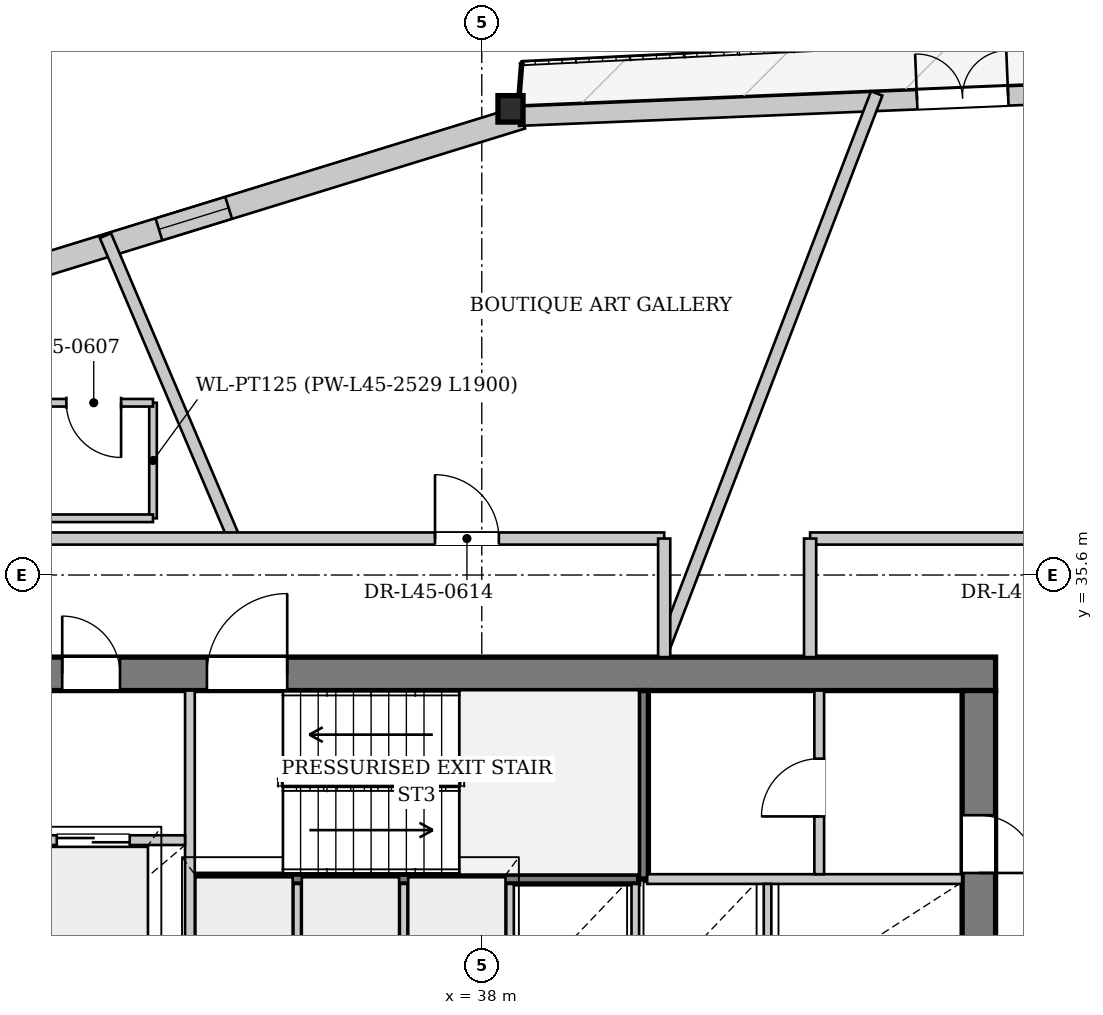
"""IFC4 building model, lengths in metres.
Left out: names, types, materials, properties, quantities, classifications, styles, units other than length and angle.
Written with IfcOpenShell. Run it as: python <this file> out.ifc"""

import sys

from ifc_helpers import new_model, si_unit, direction, frame, frame_2d, origin, origin_2d, place, context, subcontext, project, spatial, rectangle, i_section, extrude, source, transform, mapped, element, fill, save


model = new_model("IFC4")
c1 = context("Model", 3, precision=1e-05, world=origin(), true_north=direction((0.0, 1.0)))
c2 = subcontext(c1, "Body", "Model", "MODEL_VIEW")
j1 = project(units=[si_unit("LENGTHUNIT", "METRE"), si_unit("PLANEANGLEUNIT", "RADIAN")], contexts=[c1])
p1 = place(None, origin())
s1 = spatial("IfcSite", under=j1, at=p1, CompositionType="ELEMENT")
p2 = place(p1, origin())
s2 = spatial("IfcBuilding", under=s1, at=p2, CompositionType="ELEMENT")
p3 = place(p2, frame((0.0, 0.0, 171.45)))
s3 = spatial("IfcBuildingStorey", under=s2, at=p3, CompositionType="ELEMENT", Elevation=171.45)
m1 = source(origin(), c2, "Body", "SweptSolid", [
    extrude(i_section(OverallWidth=0.412, OverallDepth=0.435, WebThickness=0.031, FlangeThickness=0.05, at=origin_2d()), origin(), (0.0, 0.0, 1.0), 3.396),
])
p4 = place(p3, frame((38.6, 43.306, 0.0), z_axis=(-0.075279188452, -0.023223665587, 0.99689202281), x_axis=(0.29479123516, -0.955561681773, 0.0)))
e1 = element("IfcColumn", 1, at=p4, inside=s3, PredefinedType="COLUMN", context=c2, shape_type="MappedRepresentation", body=[
    mapped(m1, transform((0.0, 0.0, 0.0), x_axis=(1.0, 0.0, 0.0), y_axis=(0.0, 1.0, 0.0), z_axis=(0.0, 0.0, 1.0), scale=1.0)),
])
p5 = place(p3, frame((16.837, 36.396, 0.0), z_axis=(0.0, 0.0, 1.0), x_axis=(0.955604756782, 0.294651571887, 0.0)))
e2 = element("IfcWall", 2, at=p5, inside=s3, PredefinedType="SOLIDWALL", context=c2, shape_type="SweptSolid", body=[
    extrude(rectangle(XDim=22.833, YDim=0.38, at=frame_2d((11.417, 0.0))), origin(), (0.0, 0.0, 1.0), 2.722),
])
p6 = place(p5, frame((5.793, 0.0, 0.65)))
e3 = element("IfcOpeningElement", 3, at=p6, cuts=e2, PredefinedType="OPENING", context=c2, shape_type="SweptSolid", body=[
    extrude(rectangle(XDim=1.2, YDim=1.5, at=frame_2d((0.6, 0.75))), frame((0.0, 0.2, 0.0), z_axis=(0.0, -1.0, 0.0), x_axis=(1.0, 0.0, 0.0)), (0.0, 0.0, 1.0), 0.4),
])
p7 = place(p5, frame((16.59, 0.0, 0.65)))
e4 = element("IfcOpeningElement", 4, at=p7, cuts=e2, PredefinedType="OPENING", context=c2, shape_type="SweptSolid", body=[
    extrude(rectangle(XDim=1.2, YDim=1.5, at=frame_2d((0.6, 0.75))), frame((0.0, 0.2, 0.0), z_axis=(0.0, -1.0, 0.0), x_axis=(1.0, 0.0, 0.0)), (0.0, 0.0, 1.0), 0.4),
])
p8 = place(p3, frame((38.607, 43.146, 0.0), z_axis=(0.0, 0.0, 1.0), x_axis=(0.999144377046, 0.041358358487, 0.0)))
e5 = element("IfcWall", 5, at=p8, inside=s3, PredefinedType="SOLIDWALL", context=c2, shape_type="SweptSolid", body=[
    extrude(rectangle(XDim=22.833, YDim=0.32, at=frame_2d((11.417, 0.0))), origin(), (0.0, 0.0, 1.0), 2.722),
])
p9 = place(p8, frame((6.557, 0.0, 0.0)))
e6 = element("IfcOpeningElement", 6, at=p9, cuts=e5, PredefinedType="OPENING", context=c2, shape_type="SweptSolid", body=[
    extrude(rectangle(XDim=1.5, YDim=2.3, at=frame_2d((0.75, 1.15))), frame((0.0, 0.17, 0.0), z_axis=(0.0, -1.0, 0.0), x_axis=(1.0, 0.0, 0.0)), (0.0, 0.0, 1.0), 0.34),
])
p10 = place(p8, frame((15.596, 0.0, 0.252)))
e7 = element("IfcOpeningElement", 7, at=p10, cuts=e5, PredefinedType="OPENING", context=c2, shape_type="SweptSolid", body=[
    extrude(rectangle(XDim=2.6, YDim=2.35, at=frame_2d((1.3, 1.175))), frame((0.0, 0.17, 0.0), z_axis=(0.0, -1.0, 0.0), x_axis=(1.0, 0.0, 0.0)), (0.0, 0.0, 1.0), 0.34),
])
p11 = place(p3, frame((29.55, 33.975, 0.0), z_axis=(0.0, 0.0, 1.0), x_axis=(1.0, 0.0, 0.0)))
e8 = element("IfcWall", 8, at=p11, inside=s3, PredefinedType="SHEAR", context=c2, shape_type="SweptSolid", body=[
    extrude(rectangle(XDim=16.9, YDim=0.55, at=frame_2d((8.45, 0.0))), origin(), (0.0, 0.0, 1.0), 3.33),
])
p12 = place(p11, frame((1.55, 0.0, 0.0)))
e9 = element("IfcOpeningElement", 9, at=p12, cuts=e8, PredefinedType="OPENING", context=c2, shape_type="SweptSolid", body=[
    extrude(rectangle(XDim=0.95, YDim=2.1, at=frame_2d((0.475, 1.05))), frame((0.0, 0.285, 0.0), z_axis=(0.0, -1.0, 0.0), x_axis=(1.0, 0.0, 0.0)), (0.0, 0.0, 1.0), 0.57),
])
p13 = place(p11, frame((3.93, 0.0, 0.0)))
e10 = element("IfcOpeningElement", 10, at=p13, cuts=e8, PredefinedType="OPENING", context=c2, shape_type="SweptSolid", body=[
    extrude(rectangle(XDim=1.32, YDim=2.2, at=frame_2d((0.66, 1.1))), frame((0.0, 0.285, 0.0), z_axis=(0.0, -1.0, 0.0), x_axis=(1.0, 0.0, 0.0)), (0.0, 0.0, 1.0), 0.57),
])
p14 = place(p3, frame((46.175, 33.7, 0.0), z_axis=(0.0, 0.0, 1.0), x_axis=(0.0, -1.0, 0.0)))
e11 = element("IfcWall", 11, at=p14, inside=s3, PredefinedType="SHEAR", context=c2, shape_type="SweptSolid", body=[
    extrude(rectangle(XDim=14.2, YDim=0.55, at=frame_2d((7.1, 0.0))), origin(), (0.0, 0.0, 1.0), 3.33),
])
p15 = place(p14, frame((5.18, 0.0, 0.0)))
e12 = element("IfcOpeningElement", 12, at=p15, cuts=e11, PredefinedType="OPENING", context=c2, shape_type="SweptSolid", body=[
    extrude(rectangle(XDim=1.6, YDim=2.2, at=frame_2d((0.8, 1.1))), frame((0.0, 0.285, 0.0), z_axis=(0.0, -1.0, 0.0), x_axis=(1.0, 0.0, 0.0)), (0.0, 0.0, 1.0), 0.57),
])
p16 = place(p14, frame((2.05, 0.0, 0.0)))
e13 = element("IfcOpeningElement", 13, at=p16, cuts=e11, PredefinedType="OPENING", context=c2, shape_type="SweptSolid", body=[
    extrude(rectangle(XDim=0.95, YDim=2.1, at=frame_2d((0.475, 1.05))), frame((0.0, 0.285, 0.0), z_axis=(0.0, -1.0, 0.0), x_axis=(1.0, 0.0, 0.0)), (0.0, 0.0, 1.0), 0.57),
])
p17 = place(p3, frame((33.28, 30.6, 0.0), z_axis=(0.0, 0.0, 1.0), x_axis=(1.0, 0.0, 0.0)))
e14 = element("IfcWall", 14, at=p17, inside=s3, PredefinedType="PARTITIONING", context=c2, shape_type="SweptSolid", body=[
    extrude(rectangle(XDim=7.3, YDim=0.16, at=frame_2d((3.65, 0.0))), origin(), (0.0, 0.0, 1.0), 3.33),
])
p18 = place(p3, frame((40.66, 30.6, 0.0), z_axis=(0.0, 0.0, 1.0), x_axis=(0.0, 1.0, 0.0)))
e15 = element("IfcWall", 15, at=p18, inside=s3, PredefinedType="PARTITIONING", context=c2, shape_type="SweptSolid", body=[
    extrude(rectangle(XDim=3.1, YDim=0.16, at=frame_2d((1.55, 0.0))), origin(), (0.0, 0.0, 1.0), 3.33),
])
p19 = place(p3, frame((33.2, 28.44, 0.0), z_axis=(0.0, 0.0, 1.0), x_axis=(0.0, 1.0, 0.0)))
e16 = element("IfcWall", 16, at=p19, inside=s3, PredefinedType="PARTITIONING", context=c2, shape_type="SweptSolid", body=[
    extrude(rectangle(XDim=5.26, YDim=0.16, at=frame_2d((2.63, 0.0))), origin(), (0.0, 0.0, 1.0), 3.33),
])
p20 = place(p3, frame((30.1, 31.24, 0.0), z_axis=(0.0, 0.0, 1.0), x_axis=(1.0, 0.0, 0.0)))
e17 = element("IfcWall", 17, at=p20, inside=s3, PredefinedType="PARTITIONING", context=c2, shape_type="SweptSolid", body=[
    extrude(rectangle(XDim=3.02, YDim=0.16, at=frame_2d((1.51, 0.0))), origin(), (0.0, 0.0, 1.0), 3.33),
])
p21 = place(p20, frame((0.91, 0.0, 0.0)))
e18 = element("IfcOpeningElement", 18, at=p21, cuts=e17, PredefinedType="OPENING", context=c2, shape_type="SweptSolid", body=[
    extrude(rectangle(XDim=1.2, YDim=2.2, at=frame_2d((0.6, 1.1))), frame((0.0, 0.09, 0.0), z_axis=(0.0, -1.0, 0.0), x_axis=(1.0, 0.0, 0.0)), (0.0, 0.0, 1.0), 0.18),
])
p22 = place(p3, frame((40.72, 30.6, 0.0), z_axis=(0.0, 0.0, 1.0), x_axis=(1.0, 0.0, 0.0)))
e19 = element("IfcWall", 19, at=p22, inside=s3, PredefinedType="PARTITIONING", context=c2, shape_type="SweptSolid", body=[
    extrude(rectangle(XDim=5.18, YDim=0.16, at=frame_2d((2.59, 0.0))), origin(), (0.0, 0.0, 1.0), 3.33),
])
for number, where, z_axis, x_axis in (
    (20, (34.965, 28.6, 0.0), (0.0, 0.0, 1.0), (0.0, 1.0, 0.0)),
    (21, (36.715, 28.6, 0.0), (0.0, 0.0, 1.0), (0.0, 1.0, 0.0)),
    (22, (38.465, 28.6, 0.0), (0.0, 0.0, 1.0), (0.0, 1.0, 0.0)),
    (23, (40.525, 28.6, 0.0), (0.0, 0.0, 1.0), (0.0, 1.0, 0.0)),
    (24, (42.7, 28.6, 0.0), (0.0, 0.0, 1.0), (0.0, 1.0, 0.0)),
):
    element("IfcWall", number, at=place(p3, frame(where, z_axis=z_axis, x_axis=x_axis)), inside=s3, PredefinedType="PARTITIONING", context=c2, shape_type="SweptSolid", body=[
        extrude(rectangle(XDim=1.92, YDim=0.125, at=frame_2d((0.96, 0.0))), origin(), (0.0, 0.0, 1.0), 3.33),
    ])
p23 = place(p3, frame((43.55, 30.68, 0.0), z_axis=(0.0, 0.0, 1.0), x_axis=(0.0, 1.0, 0.0)))
e25 = element("IfcWall", 25, at=p23, inside=s3, PredefinedType="PARTITIONING", context=c2, shape_type="SweptSolid", body=[
    extrude(rectangle(XDim=3.02, YDim=0.16, at=frame_2d((1.51, 0.0))), origin(), (0.0, 0.0, 1.0), 3.33),
])
p24 = place(p23, frame((0.95, 0.0, 0.0)))
e26 = element("IfcOpeningElement", 26, at=p24, cuts=e25, PredefinedType="OPENING", context=c2, shape_type="SweptSolid", body=[
    extrude(rectangle(XDim=0.95, YDim=2.1, at=frame_2d((0.475, 1.05))), frame((0.0, 0.09, 0.0), z_axis=(0.0, -1.0, 0.0), x_axis=(1.0, 0.0, 0.0)), (0.0, 0.0, 1.0), 0.18),
])
p25 = place(p3, frame((41.0, 34.415, 0.0), z_axis=(0.0, 0.0, 1.0), x_axis=(0.358366692875, 0.933580908887, 0.0)))
e27 = element("IfcWall", 27, at=p25, inside=s3, PredefinedType="PARTITIONING", context=c2, shape_type="SweptSolid", body=[
    extrude(rectangle(XDim=9.752, YDim=0.2, at=frame_2d((4.876, 0.0))), origin(), (0.0, 0.0, 1.0), 3.33),
])
p26 = place(p3, frame((33.925, 36.2, 0.0), z_axis=(0.0, 0.0, 1.0), x_axis=(-0.390725959749, 0.920507047436, 0.0)))
e28 = element("IfcWall", 28, at=p26, inside=s3, PredefinedType="PARTITIONING", context=c2, shape_type="SweptSolid", body=[
    extrude(rectangle(XDim=5.411, YDim=0.2, at=frame_2d((2.706, 0.0))), origin(), (0.0, 0.0, 1.0), 3.33),
])
p27 = place(p3, frame((32.593, 36.533, 0.0), z_axis=(0.0, 0.0, 1.0), x_axis=(0.0, 1.0, 0.0)))
e29 = element("IfcWall", 29, at=p27, inside=s3, PredefinedType="PARTITIONING", context=c2, shape_type="SweptSolid", body=[
    extrude(rectangle(XDim=1.9, YDim=0.125, at=frame_2d((0.95, 0.0))), origin(), (0.0, 0.0, 1.0), 3.33),
])
p28 = place(p3, frame((32.593, 38.433, 0.0), z_axis=(0.0, 0.0, 1.0), x_axis=(-1.0, 0.0, 0.0)))
e30 = element("IfcWall", 30, at=p28, inside=s3, PredefinedType="PARTITIONING", context=c2, shape_type="SweptSolid", body=[
    extrude(rectangle(XDim=1.95, YDim=0.125, at=frame_2d((0.975, 0.0))), origin(), (0.0, 0.0, 1.0), 3.33),
])
p29 = place(p28, frame((0.525, 0.0, 0.0)))
e31 = element("IfcOpeningElement", 31, at=p29, cuts=e30, PredefinedType="OPENING", context=c2, shape_type="SweptSolid", body=[
    extrude(rectangle(XDim=0.9, YDim=2.1, at=frame_2d((0.45, 1.05))), frame((0.0, 0.073, 0.0), z_axis=(0.0, -1.0, 0.0), x_axis=(1.0, 0.0, 0.0)), (0.0, 0.0, 1.0), 0.145),
])
p30 = place(p3, frame((30.643, 36.533, 0.0), z_axis=(0.0, 0.0, 1.0), x_axis=(1.0, 0.0, 0.0)))
e32 = element("IfcWall", 32, at=p30, inside=s3, PredefinedType="PARTITIONING", context=c2, shape_type="SweptSolid", body=[
    extrude(rectangle(XDim=1.95, YDim=0.125, at=frame_2d((0.975, 0.0))), origin(), (0.0, 0.0, 1.0), 3.33),
])
p31 = place(p3, frame((27.6, 36.2, 0.0), z_axis=(0.0, 0.0, 1.0), x_axis=(1.0, 0.0, 0.0)))
e33 = element("IfcWall", 33, at=p31, inside=s3, PredefinedType="PARTITIONING", context=c2, shape_type="SweptSolid", body=[
    extrude(rectangle(XDim=13.4, YDim=0.2, at=frame_2d((6.7, 0.0))), origin(), (0.0, 0.0, 1.0), 3.33),
])
p32 = place(p31, frame((9.631, 0.0, 0.0)))
e34 = element("IfcOpeningElement", 34, at=p32, cuts=e33, PredefinedType="OPENING", context=c2, shape_type="SweptSolid", body=[
    extrude(rectangle(XDim=1.05, YDim=2.2, at=frame_2d((0.525, 1.1))), frame((0.0, 0.11, 0.0), z_axis=(0.0, -1.0, 0.0), x_axis=(1.0, 0.0, 0.0)), (0.0, 0.0, 1.0), 0.22),
])
p33 = place(p3, frame((41.0, 34.25, 0.0), z_axis=(0.0, 0.0, 1.0), x_axis=(0.0, 1.0, 0.0)))
e35 = element("IfcWall", 35, at=p33, inside=s3, PredefinedType="PARTITIONING", context=c2, shape_type="SweptSolid", body=[
    extrude(rectangle(XDim=1.95, YDim=0.2, at=frame_2d((0.975, 0.0))), origin(), (0.0, 0.0, 1.0), 3.33),
])
p34 = place(p3, frame((43.4, 36.2, 0.0), z_axis=(0.0, 0.0, 1.0), x_axis=(1.0, 0.0, 0.0)))
e36 = element("IfcWall", 36, at=p34, inside=s3, PredefinedType="PARTITIONING", context=c2, shape_type="SweptSolid", body=[
    extrude(rectangle(XDim=5.0, YDim=0.2, at=frame_2d((2.5, 0.0))), origin(), (0.0, 0.0, 1.0), 3.33),
])
p35 = place(p34, frame((3.65, 0.0, 0.0)))
e37 = element("IfcOpeningElement", 37, at=p35, cuts=e36, PredefinedType="OPENING", context=c2, shape_type="SweptSolid", body=[
    extrude(rectangle(XDim=1.05, YDim=2.2, at=frame_2d((0.525, 1.1))), frame((0.0, 0.11, 0.0), z_axis=(0.0, -1.0, 0.0), x_axis=(1.0, 0.0, 0.0)), (0.0, 0.0, 1.0), 0.22),
])
p36 = place(p3, frame((43.4, 34.25, 0.0), z_axis=(0.0, 0.0, 1.0), x_axis=(0.0, 1.0, 0.0)))
e38 = element("IfcWall", 38, at=p36, inside=s3, PredefinedType="PARTITIONING", context=c2, shape_type="SweptSolid", body=[
    extrude(rectangle(XDim=1.95, YDim=0.2, at=frame_2d((0.975, 0.0))), origin(), (0.0, 0.0, 1.0), 3.33),
])
m2 = source(origin(), c2, "Body", "SweptSolid", [
    extrude(rectangle(XDim=1.2, YDim=1.5, at=frame_2d((0.6, 0.75))), frame((0.0, 0.03, 0.0), z_axis=(0.0, -1.0, 0.0), x_axis=(1.0, 0.0, 0.0)), (0.0, 0.0, 1.0), 0.06),
])
p37 = place(p7, origin())
e39 = element("IfcWindow", 39, at=p37, inside=s3, PartitioningType="SINGLE_PANEL", PredefinedType="WINDOW", context=c2, shape_type="MappedRepresentation", body=[
    mapped(m2, transform((0.0, 0.0, 0.0), x_axis=(1.0, 0.0, 0.0), y_axis=(0.0, 1.0, 0.0), z_axis=(0.0, 0.0, 1.0), scale=1.0)),
])
fill(e4, e39)
m3 = source(origin(), c2, "Body", "SweptSolid", [
    extrude(rectangle(XDim=1.5, YDim=2.3, at=frame_2d((0.75, 1.15))), frame((0.0, 0.025, 0.0), z_axis=(0.0, -1.0, 0.0), x_axis=(1.0, 0.0, 0.0)), (0.0, 0.0, 1.0), 0.05),
])
p38 = place(p9, origin())
e40 = element("IfcDoor", 40, at=p38, inside=s3, OperationType="DOUBLE_DOOR_SINGLE_SWING", PredefinedType="DOOR", context=c2, shape_type="MappedRepresentation", body=[
    mapped(m3, transform((0.0, 0.0, 0.0), x_axis=(1.0, 0.0, 0.0), y_axis=(0.0, 1.0, 0.0), z_axis=(0.0, 0.0, 1.0), scale=1.0)),
])
fill(e6, e40)
m4 = source(origin(), c2, "Body", "SweptSolid", [
    extrude(rectangle(XDim=0.95, YDim=2.1, at=frame_2d((0.475, 1.05))), frame((0.0, 0.025, 0.0), z_axis=(0.0, -1.0, 0.0), x_axis=(1.0, 0.0, 0.0)), (0.0, 0.0, 1.0), 0.05),
])
p39 = place(p12, origin())
e41 = element("IfcDoor", 41, at=p39, inside=s3, OperationType="SINGLE_SWING_LEFT", PredefinedType="DOOR", context=c2, shape_type="MappedRepresentation", body=[
    mapped(m4, transform((0.0, 0.0, 0.0), x_axis=(1.0, 0.0, 0.0), y_axis=(0.0, 1.0, 0.0), z_axis=(0.0, 0.0, 1.0), scale=1.0)),
])
fill(e9, e41)
m5 = source(origin(), c2, "Body", "SweptSolid", [
    extrude(rectangle(XDim=1.32, YDim=2.2, at=frame_2d((0.66, 1.1))), frame((0.0, 0.025, 0.0), z_axis=(0.0, -1.0, 0.0), x_axis=(1.0, 0.0, 0.0)), (0.0, 0.0, 1.0), 0.05),
])
p40 = place(p13, origin())
e42 = element("IfcDoor", 42, at=p40, inside=s3, OperationType="SINGLE_SWING_RIGHT", PredefinedType="DOOR", context=c2, shape_type="MappedRepresentation", body=[
    mapped(m5, transform((0.0, 0.0, 0.0), x_axis=(1.0, 0.0, 0.0), y_axis=(0.0, 1.0, 0.0), z_axis=(0.0, 0.0, 1.0), scale=1.0)),
])
fill(e10, e42)
m6 = source(origin(), c2, "Body", "SweptSolid", [
    extrude(rectangle(XDim=1.2, YDim=2.2, at=frame_2d((0.6, 1.1))), frame((0.0, 0.025, 0.0), z_axis=(0.0, -1.0, 0.0), x_axis=(1.0, 0.0, 0.0)), (0.0, 0.0, 1.0), 0.05),
])
p41 = place(p21, origin())
e43 = element("IfcDoor", 43, at=p41, inside=s3, OperationType="DOUBLE_DOOR_SLIDING", PredefinedType="DOOR", context=c2, shape_type="MappedRepresentation", body=[
    mapped(m6, transform((0.0, 0.0, 0.0), x_axis=(1.0, 0.0, 0.0), y_axis=(0.0, 1.0, 0.0), z_axis=(0.0, 0.0, 1.0), scale=1.0)),
])
fill(e18, e43)
p42 = place(p24, origin())
e44 = element("IfcDoor", 44, at=p42, inside=s3, OperationType="SINGLE_SWING_LEFT", PredefinedType="DOOR", context=c2, shape_type="MappedRepresentation", body=[
    mapped(m4, transform((0.0, 0.0, 0.0), x_axis=(1.0, 0.0, 0.0), y_axis=(0.0, 1.0, 0.0), z_axis=(0.0, 0.0, 1.0), scale=1.0)),
])
fill(e26, e44)
p43 = place(p16, origin())
e45 = element("IfcDoor", 45, at=p43, inside=s3, OperationType="SINGLE_SWING_RIGHT", PredefinedType="DOOR", context=c2, shape_type="MappedRepresentation", body=[
    mapped(m4, transform((0.0, 0.0, 0.0), x_axis=(1.0, 0.0, 0.0), y_axis=(0.0, 1.0, 0.0), z_axis=(0.0, 0.0, 1.0), scale=1.0)),
])
fill(e13, e45)
m7 = source(origin(), c2, "Body", "SweptSolid", [
    extrude(rectangle(XDim=0.9, YDim=2.1, at=frame_2d((0.45, 1.05))), frame((0.0, 0.025, 0.0), z_axis=(0.0, -1.0, 0.0), x_axis=(1.0, 0.0, 0.0)), (0.0, 0.0, 1.0), 0.05),
])
p44 = place(p29, origin())
e46 = element("IfcDoor", 46, at=p44, inside=s3, OperationType="SINGLE_SWING_LEFT", PredefinedType="DOOR", context=c2, shape_type="MappedRepresentation", body=[
    mapped(m7, transform((0.0, 0.0, 0.0), x_axis=(1.0, 0.0, 0.0), y_axis=(0.0, 1.0, 0.0), z_axis=(0.0, 0.0, 1.0), scale=1.0)),
])
fill(e31, e46)
m8 = source(origin(), c2, "Body", "SweptSolid", [
    extrude(rectangle(XDim=1.05, YDim=2.2, at=frame_2d((0.525, 1.1))), frame((0.0, 0.025, 0.0), z_axis=(0.0, -1.0, 0.0), x_axis=(1.0, 0.0, 0.0)), (0.0, 0.0, 1.0), 0.05),
])
p45 = place(p32, origin())
e47 = element("IfcDoor", 47, at=p45, inside=s3, OperationType="SINGLE_SWING_LEFT", PredefinedType="DOOR", context=c2, shape_type="MappedRepresentation", body=[
    mapped(m8, transform((0.0, 0.0, 0.0), x_axis=(1.0, 0.0, 0.0), y_axis=(0.0, 1.0, 0.0), z_axis=(0.0, 0.0, 1.0), scale=1.0)),
])
fill(e34, e47)
save(model, sys.argv[1])
